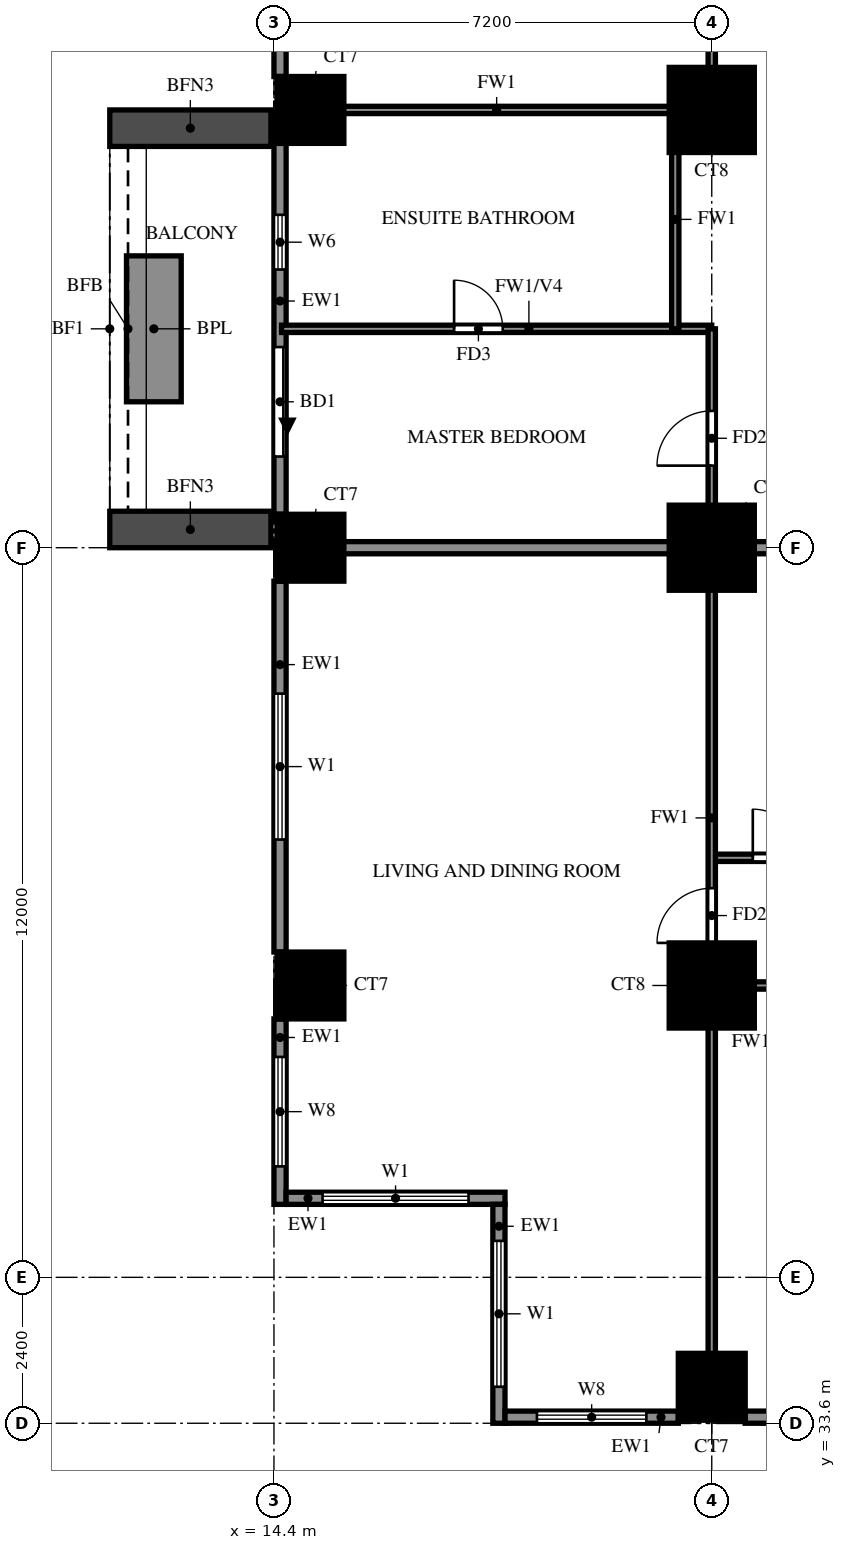
"""IFC4 building model, lengths in metres.
Left out: names, types, materials, properties, quantities, classifications, styles, units other than length and angle.
Written with IfcOpenShell. Run it as: python <this file> out.ifc"""

import sys

from ifc_helpers import new_model, si_unit, direction, frame, frame_2d, origin, origin_2d, place, context, subcontext, project, spatial, rectangle, extrude, source, transform, mapped, element, fill, save


model = new_model("IFC4")
c1 = context("Model", 3, precision=1e-05, world=origin(), true_north=direction((0.0, 1.0)))
c2 = subcontext(c1, "Body", "Model", "MODEL_VIEW")
j1 = project(units=[si_unit("LENGTHUNIT", "METRE"), si_unit("PLANEANGLEUNIT", "RADIAN")], contexts=[c1])
p1 = place(None, origin())
s1 = spatial("IfcSite", under=j1, at=p1, CompositionType="ELEMENT")
p2 = place(p1, origin())
s2 = spatial("IfcBuilding", under=s1, at=p2, CompositionType="ELEMENT")
p3 = place(p2, frame((0.0, 0.0, 58.5)))
s3 = spatial("IfcBuildingStorey", under=s2, at=p3, CompositionType="ELEMENT", Elevation=58.5)
m1 = source(origin(), c2, "Body", "SweptSolid", [
    extrude(rectangle(XDim=1.1, YDim=1.1, at=origin_2d()), origin(), (0.0, 0.0, 1.0), 3.18),
])
for number, where, z_axis, x_axis in (
    (1, (21.6, 34.2, 0.0), (0.0, 0.0, 1.0), (1.0, 0.0, 0.0)),
    (2, (15.0, 40.8, 0.0), (0.0, 0.0, 1.0), (1.0, 0.0, 0.0)),
):
    element("IfcColumn", number, at=place(p3, frame(where, z_axis=z_axis, x_axis=x_axis)), inside=s3, PredefinedType="COLUMN", context=c2, shape_type="MappedRepresentation", body=[
        mapped(m1, transform((0.0, 0.0, 0.0))),
    ])
m2 = source(origin(), c2, "Body", "SweptSolid", [
    extrude(rectangle(XDim=1.4, YDim=1.4, at=origin_2d()), origin(), (0.0, 0.0, 1.0), 3.18),
])
p4 = place(p3, frame((21.6, 40.8, 0.0), z_axis=(0.0, 0.0, 1.0), x_axis=(1.0, 0.0, 0.0)))
e3 = element("IfcColumn", 3, at=p4, inside=s3, PredefinedType="COLUMN", context=c2, shape_type="MappedRepresentation", body=[
    mapped(m2, transform((0.0, 0.0, 0.0))),
])
p5 = place(p3, frame((15.0, 48.0, 0.0), z_axis=(0.0, 0.0, 1.0), x_axis=(1.0, 0.0, 0.0)))
e4 = element("IfcColumn", 4, at=p5, inside=s3, PredefinedType="COLUMN", context=c2, shape_type="MappedRepresentation", body=[
    mapped(m1, transform((0.0, 0.0, 0.0))),
])
p6 = place(p3, frame((21.6, 48.0, 0.0), z_axis=(0.0, 0.0, 1.0), x_axis=(1.0, 0.0, 0.0)))
e5 = element("IfcColumn", 5, at=p6, inside=s3, PredefinedType="COLUMN", context=c2, shape_type="MappedRepresentation", body=[
    mapped(m2, transform((0.0, 0.0, 0.0))),
])
p7 = place(p3, frame((15.0, 55.2, 0.0), z_axis=(0.0, 0.0, 1.0), x_axis=(1.0, 0.0, 0.0)))
e6 = element("IfcColumn", 6, at=p7, inside=s3, PredefinedType="COLUMN", context=c2, shape_type="MappedRepresentation", body=[
    mapped(m1, transform((0.0, 0.0, 0.0))),
])
p8 = place(p3, frame((21.6, 55.2, 0.0), z_axis=(0.0, 0.0, 1.0), x_axis=(1.0, 0.0, 0.0)))
e7 = element("IfcColumn", 7, at=p8, inside=s3, PredefinedType="COLUMN", context=c2, shape_type="MappedRepresentation", body=[
    mapped(m2, transform((0.0, 0.0, 0.0))),
])
p9 = place(p3, frame((14.5, 61.85, 0.0), z_axis=(0.0, 0.0, 1.0), x_axis=(0.0, -1.0, 0.0)))
e8 = element("IfcWall", 8, at=p9, inside=s3, PredefinedType="SOLIDWALL", context=c2, shape_type="SweptSolid", body=[
    extrude(rectangle(XDim=6.1, YDim=0.2, at=frame_2d((3.05, 0.0))), origin(), (0.0, 0.0, 1.0), 3.18),
])
p10 = place(p9, frame((3.575, 0.0, 0.6)))
e9 = element("IfcOpeningElement", 9, at=p10, cuts=e8, PredefinedType="OPENING", context=c2, shape_type="SweptSolid", body=[
    extrude(rectangle(XDim=1.8, YDim=2.4, at=frame_2d((0.9, 1.2))), frame((0.0, 0.11, 0.0), z_axis=(0.0, -1.0, 0.0), x_axis=(1.0, 0.0, 0.0)), (0.0, 0.0, 1.0), 0.22),
])
p11 = place(p9, frame((0.725, 0.0, 0.6)))
e10 = element("IfcOpeningElement", 10, at=p11, cuts=e8, PredefinedType="OPENING", context=c2, shape_type="SweptSolid", body=[
    extrude(rectangle(XDim=1.8, YDim=2.4, at=frame_2d((0.9, 1.2))), frame((0.0, 0.11, 0.0), z_axis=(0.0, -1.0, 0.0), x_axis=(1.0, 0.0, 0.0)), (0.0, 0.0, 1.0), 0.22),
])
p12 = place(p3, frame((14.5, 54.65, 0.0), z_axis=(0.0, 0.0, 1.0), x_axis=(0.0, -1.0, 0.0)))
e11 = element("IfcWall", 11, at=p12, inside=s3, PredefinedType="SOLIDWALL", context=c2, shape_type="SweptSolid", body=[
    extrude(rectangle(XDim=6.1, YDim=0.2, at=frame_2d((3.05, 0.0))), origin(), (0.0, 0.0, 1.0), 3.18),
])
p13 = place(p12, frame((3.35, 0.0, 0.0)))
e12 = element("IfcOpeningElement", 12, at=p13, cuts=e11, PredefinedType="OPENING", context=c2, shape_type="SweptSolid", body=[
    extrude(rectangle(XDim=1.8, YDim=2.4, at=frame_2d((0.9, 1.2))), frame((0.0, 0.11, 0.0), z_axis=(0.0, -1.0, 0.0), x_axis=(1.0, 0.0, 0.0)), (0.0, 0.0, 1.0), 0.22),
])
p14 = place(p12, frame((1.175, 0.0, 1.5)))
e13 = element("IfcOpeningElement", 13, at=p14, cuts=e11, PredefinedType="OPENING", context=c2, shape_type="SweptSolid", body=[
    extrude(rectangle(XDim=0.9, YDim=0.9, at=frame_2d((0.45, 0.45))), frame((0.0, 0.11, 0.0), z_axis=(0.0, -1.0, 0.0), x_axis=(1.0, 0.0, 0.0)), (0.0, 0.0, 1.0), 0.22),
])
p15 = place(p3, frame((14.5, 47.45, 0.0), z_axis=(0.0, 0.0, 1.0), x_axis=(0.0, -1.0, 0.0)))
e14 = element("IfcWall", 14, at=p15, inside=s3, PredefinedType="SOLIDWALL", context=c2, shape_type="SweptSolid", body=[
    extrude(rectangle(XDim=6.1, YDim=0.2, at=frame_2d((3.05, 0.0))), origin(), (0.0, 0.0, 1.0), 3.18),
])
p16 = place(p15, frame((1.85, 0.0, 0.6)))
e15 = element("IfcOpeningElement", 15, at=p16, cuts=e14, PredefinedType="OPENING", context=c2, shape_type="SweptSolid", body=[
    extrude(rectangle(XDim=2.4, YDim=2.4, at=frame_2d((1.2, 1.2))), frame((0.0, 0.11, 0.0), z_axis=(0.0, -1.0, 0.0), x_axis=(1.0, 0.0, 0.0)), (0.0, 0.0, 1.0), 0.22),
])
p17 = place(p3, frame((14.5, 40.25, 0.0), z_axis=(0.0, 0.0, 1.0), x_axis=(0.0, -1.0, 0.0)))
e16 = element("IfcWall", 16, at=p17, inside=s3, PredefinedType="SOLIDWALL", context=c2, shape_type="SweptSolid", body=[
    extrude(rectangle(XDim=3.05, YDim=0.2, at=frame_2d((1.525, 0.0))), origin(), (0.0, 0.0, 1.0), 3.18),
])
p18 = place(p17, frame((0.625, 0.0, 0.6)))
e17 = element("IfcOpeningElement", 17, at=p18, cuts=e16, PredefinedType="OPENING", context=c2, shape_type="SweptSolid", body=[
    extrude(rectangle(XDim=1.8, YDim=2.4, at=frame_2d((0.9, 1.2))), frame((0.0, 0.11, 0.0), z_axis=(0.0, -1.0, 0.0), x_axis=(1.0, 0.0, 0.0)), (0.0, 0.0, 1.0), 0.22),
])
p19 = place(p3, frame((14.6, 37.3, 0.0), z_axis=(0.0, 0.0, 1.0), x_axis=(1.0, 0.0, 0.0)))
e18 = element("IfcWall", 18, at=p19, inside=s3, PredefinedType="SOLIDWALL", context=c2, shape_type="SweptSolid", body=[
    extrude(rectangle(XDim=3.6, YDim=0.2, at=frame_2d((1.8, 0.0))), origin(), (0.0, 0.0, 1.0), 3.18),
])
p20 = place(p19, frame((0.6, 0.0, 0.6)))
e19 = element("IfcOpeningElement", 19, at=p20, cuts=e18, PredefinedType="OPENING", context=c2, shape_type="SweptSolid", body=[
    extrude(rectangle(XDim=2.4, YDim=2.4, at=frame_2d((1.2, 1.2))), frame((0.0, 0.11, 0.0), z_axis=(0.0, -1.0, 0.0), x_axis=(1.0, 0.0, 0.0)), (0.0, 0.0, 1.0), 0.22),
])
p21 = place(p3, frame((18.1, 37.2, 0.0), z_axis=(0.0, 0.0, 1.0), x_axis=(0.0, -1.0, 0.0)))
e20 = element("IfcWall", 20, at=p21, inside=s3, PredefinedType="SOLIDWALL", context=c2, shape_type="SweptSolid", body=[
    extrude(rectangle(XDim=3.6, YDim=0.2, at=frame_2d((1.8, 0.0))), origin(), (0.0, 0.0, 1.0), 3.18),
])
p22 = place(p21, frame((0.6, 0.0, 0.6)))
e21 = element("IfcOpeningElement", 21, at=p22, cuts=e20, PredefinedType="OPENING", context=c2, shape_type="SweptSolid", body=[
    extrude(rectangle(XDim=2.4, YDim=2.4, at=frame_2d((1.2, 1.2))), frame((0.0, 0.11, 0.0), z_axis=(0.0, -1.0, 0.0), x_axis=(1.0, 0.0, 0.0)), (0.0, 0.0, 1.0), 0.22),
])
p23 = place(p3, frame((18.2, 33.7, 0.0), z_axis=(0.0, 0.0, 1.0), x_axis=(1.0, 0.0, 0.0)))
e22 = element("IfcWall", 22, at=p23, inside=s3, PredefinedType="SOLIDWALL", context=c2, shape_type="SweptSolid", body=[
    extrude(rectangle(XDim=2.85, YDim=0.2, at=frame_2d((1.425, 0.0))), origin(), (0.0, 0.0, 1.0), 3.18),
])
p24 = place(p23, frame((0.525, 0.0, 0.6)))
e23 = element("IfcOpeningElement", 23, at=p24, cuts=e22, PredefinedType="OPENING", context=c2, shape_type="SweptSolid", body=[
    extrude(rectangle(XDim=1.8, YDim=2.4, at=frame_2d((0.9, 1.2))), frame((0.0, 0.11, 0.0), z_axis=(0.0, -1.0, 0.0), x_axis=(1.0, 0.0, 0.0)), (0.0, 0.0, 1.0), 0.22),
])
p25 = place(p3, frame((22.15, 33.7, 0.0), z_axis=(0.0, 0.0, 1.0), x_axis=(1.0, 0.0, 0.0)))
e24 = element("IfcWall", 24, at=p25, inside=s3, PredefinedType="SOLIDWALL", context=c2, shape_type="SweptSolid", body=[
    extrude(rectangle(XDim=6.1, YDim=0.2, at=frame_2d((3.05, 0.0))), origin(), (0.0, 0.0, 1.0), 3.18),
])
p26 = place(p25, frame((0.725, 0.0, 0.6)))
e25 = element("IfcOpeningElement", 25, at=p26, cuts=e24, PredefinedType="OPENING", context=c2, shape_type="SweptSolid", body=[
    extrude(rectangle(XDim=1.8, YDim=2.4, at=frame_2d((0.9, 1.2))), frame((0.0, 0.11, 0.0), z_axis=(0.0, -1.0, 0.0), x_axis=(1.0, 0.0, 0.0)), (0.0, 0.0, 1.0), 0.22),
])
p27 = place(p25, frame((4.025, 0.0, 1.5)))
e26 = element("IfcOpeningElement", 26, at=p27, cuts=e24, PredefinedType="OPENING", context=c2, shape_type="SweptSolid", body=[
    extrude(rectangle(XDim=0.9, YDim=0.9, at=frame_2d((0.45, 0.45))), frame((0.0, 0.11, 0.0), z_axis=(0.0, -1.0, 0.0), x_axis=(1.0, 0.0, 0.0)), (0.0, 0.0, 1.0), 0.22),
])
for number, where, z_axis, x_axis in (
    (27, (14.35, 54.9, 0.0), (0.0, 0.0, 1.0), (-1.0, 0.0, 0.0)),
    (28, (14.35, 48.3, 0.0), (0.0, 0.0, 1.0), (-1.0, 0.0, 0.0)),
):
    element("IfcWall", number, at=place(p3, frame(where, z_axis=z_axis, x_axis=x_axis)), inside=s3, PredefinedType="SOLIDWALL", context=c2, shape_type="SweptSolid", body=[
        extrude(rectangle(XDim=2.65, YDim=0.6, at=frame_2d((1.325, 0.0))), origin(), (0.0, 0.0, 1.0), 2.85),
    ])
p28 = place(p3, frame((12.425, 52.8, 0.0), z_axis=(0.0, 0.0, 1.0), x_axis=(0.0, -1.0, 0.0)))
e29 = element("IfcWall", 29, at=p28, inside=s3, PredefinedType="SOLIDWALL", context=c2, shape_type="SweptSolid", body=[
    extrude(rectangle(XDim=2.4, YDim=0.9, at=frame_2d((1.2, 0.0))), origin(), (0.0, 0.0, 1.0), 0.9),
])
p29 = place(p3, frame((14.525, 48.0, 0.0), z_axis=(0.0, 0.0, 1.0), x_axis=(1.0, 0.0, 0.0)))
e30 = element("IfcWall", 30, at=p29, inside=s3, PredefinedType="SOLIDWALL", context=c2, shape_type="SweptSolid", body=[
    extrude(rectangle(XDim=19.075, YDim=0.2, at=frame_2d((9.538, 0.0))), origin(), (0.0, 0.0, 1.0), 3.18),
])
p30 = place(p3, frame((21.6, 40.8, 0.0), z_axis=(0.0, 0.0, 1.0), x_axis=(1.0, 0.0, 0.0)))
e31 = element("IfcWall", 31, at=p30, inside=s3, PredefinedType="PARTITIONING", context=c2, shape_type="SweptSolid", body=[
    extrude(rectangle(XDim=3.6, YDim=0.12, at=frame_2d((1.8, 0.0))), origin(), (0.0, 0.0, 1.0), 3.18),
])
p31 = place(p30, frame((1.35, 0.0, 0.0)))
e32 = element("IfcOpeningElement", 32, at=p31, cuts=e31, PredefinedType="OPENING", context=c2, shape_type="SweptSolid", body=[
    extrude(rectangle(XDim=0.9, YDim=2.1, at=frame_2d((0.45, 1.05))), frame((0.0, 0.07, 0.0), z_axis=(0.0, -1.0, 0.0), x_axis=(1.0, 0.0, 0.0)), (0.0, 0.0, 1.0), 0.14),
])
p32 = place(p3, frame((21.6, 42.9, 0.0), z_axis=(0.0, 0.0, 1.0), x_axis=(1.0, 0.0, 0.0)))
e33 = element("IfcWall", 33, at=p32, inside=s3, PredefinedType="PARTITIONING", context=c2, shape_type="SweptSolid", body=[
    extrude(rectangle(XDim=12.0, YDim=0.12, at=frame_2d((6.0, 0.0))), origin(), (0.0, 0.0, 1.0), 3.18),
])
p33 = place(p32, frame((0.675, 0.0, 0.0)))
e34 = element("IfcOpeningElement", 34, at=p33, cuts=e33, PredefinedType="OPENING", context=c2, shape_type="SweptSolid", body=[
    extrude(rectangle(XDim=0.8, YDim=2.1, at=frame_2d((0.4, 1.05))), frame((0.0, 0.07, 0.0), z_axis=(0.0, -1.0, 0.0), x_axis=(1.0, 0.0, 0.0)), (0.0, 0.0, 1.0), 0.14),
])
p34 = place(p32, frame((4.0, 0.0, 0.0)))
e35 = element("IfcOpeningElement", 35, at=p34, cuts=e33, PredefinedType="OPENING", context=c2, shape_type="SweptSolid", body=[
    extrude(rectangle(XDim=0.9, YDim=2.1, at=frame_2d((0.45, 1.05))), frame((0.0, 0.07, 0.0), z_axis=(0.0, -1.0, 0.0), x_axis=(1.0, 0.0, 0.0)), (0.0, 0.0, 1.0), 0.14),
])
p35 = place(p32, frame((7.475, 0.0, 0.0)))
e36 = element("IfcOpeningElement", 36, at=p35, cuts=e33, PredefinedType="OPENING", context=c2, shape_type="SweptSolid", body=[
    extrude(rectangle(XDim=0.9, YDim=2.1, at=frame_2d((0.45, 1.05))), frame((0.0, 0.07, 0.0), z_axis=(0.0, -1.0, 0.0), x_axis=(1.0, 0.0, 0.0)), (0.0, 0.0, 1.0), 0.14),
])
p36 = place(p32, frame((10.1, 0.0, 0.0)))
e37 = element("IfcOpeningElement", 37, at=p36, cuts=e33, PredefinedType="OPENING", context=c2, shape_type="SweptSolid", body=[
    extrude(rectangle(XDim=0.9, YDim=2.1, at=frame_2d((0.45, 1.05))), frame((0.0, 0.07, 0.0), z_axis=(0.0, -1.0, 0.0), x_axis=(1.0, 0.0, 0.0)), (0.0, 0.0, 1.0), 0.14),
])
p37 = place(p3, frame((14.525, 51.6, 0.0), z_axis=(0.0, 0.0, 1.0), x_axis=(1.0, 0.0, 0.0)))
e38 = element("IfcWall", 38, at=p37, inside=s3, PredefinedType="PARTITIONING", context=c2, shape_type="SweptSolid", body=[
    extrude(rectangle(XDim=7.075, YDim=0.12, at=frame_2d((3.538, 0.0))), origin(), (0.0, 0.0, 1.0), 2.28),
])
p38 = place(p37, frame((2.837, 0.0, 0.0)))
e39 = element("IfcOpeningElement", 39, at=p38, cuts=e38, PredefinedType="OPENING", context=c2, shape_type="SweptSolid", body=[
    extrude(rectangle(XDim=0.8, YDim=2.1, at=frame_2d((0.4, 1.05))), frame((0.0, 0.07, 0.0), z_axis=(0.0, -1.0, 0.0), x_axis=(1.0, 0.0, 0.0)), (0.0, 0.0, 1.0), 0.14),
])
p39 = place(p3, frame((14.525, 55.2, 0.0), z_axis=(0.0, 0.0, 1.0), x_axis=(1.0, 0.0, 0.0)))
e40 = element("IfcWall", 40, at=p39, inside=s3, PredefinedType="PARTITIONING", context=c2, shape_type="SweptSolid", body=[
    extrude(rectangle(XDim=7.075, YDim=0.12, at=frame_2d((3.538, 0.0))), origin(), (0.0, 0.0, 1.0), 3.18),
])
p40 = place(p3, frame((21.0, 51.6, 0.0), z_axis=(0.0, 0.0, 1.0), x_axis=(0.0, 1.0, 0.0)))
e41 = element("IfcWall", 41, at=p40, inside=s3, PredefinedType="PARTITIONING", context=c2, shape_type="SweptSolid", body=[
    extrude(rectangle(XDim=3.6, YDim=0.12, at=frame_2d((1.8, 0.0))), origin(), (0.0, 0.0, 1.0), 3.18),
])
p41 = place(p3, frame((21.6, 33.725, 0.0), z_axis=(0.0, 0.0, 1.0), x_axis=(0.0, 1.0, 0.0)))
e42 = element("IfcWall", 42, at=p41, inside=s3, PredefinedType="PARTITIONING", context=c2, shape_type="SweptSolid", body=[
    extrude(rectangle(XDim=17.875, YDim=0.12, at=frame_2d((8.938, 0.0))), origin(), (0.0, 0.0, 1.0), 3.18),
])
p42 = place(p41, frame((7.775, 0.0, 0.0)))
e43 = element("IfcOpeningElement", 43, at=p42, cuts=e42, PredefinedType="OPENING", context=c2, shape_type="SweptSolid", body=[
    extrude(rectangle(XDim=0.9, YDim=2.1, at=frame_2d((0.45, 1.05))), frame((0.0, 0.07, 0.0), z_axis=(0.0, -1.0, 0.0), x_axis=(1.0, 0.0, 0.0)), (0.0, 0.0, 1.0), 0.14),
])
p43 = place(p41, frame((15.625, 0.0, 0.0)))
e44 = element("IfcOpeningElement", 44, at=p43, cuts=e42, PredefinedType="OPENING", context=c2, shape_type="SweptSolid", body=[
    extrude(rectangle(XDim=0.9, YDim=2.1, at=frame_2d((0.45, 1.05))), frame((0.0, 0.07, 0.0), z_axis=(0.0, -1.0, 0.0), x_axis=(1.0, 0.0, 0.0)), (0.0, 0.0, 1.0), 0.14),
])
p44 = place(p3, frame((21.6, 55.2, 0.0), z_axis=(0.0, 0.0, 1.0), x_axis=(0.0, 1.0, 0.0)))
e45 = element("IfcWall", 45, at=p44, inside=s3, PredefinedType="PARTITIONING", context=c2, shape_type="SweptSolid", body=[
    extrude(rectangle(XDim=14.4, YDim=0.12, at=frame_2d((7.2, 0.0))), origin(), (0.0, 0.0, 1.0), 3.18),
])
p45 = place(p44, frame((1.05, 0.0, 0.0)))
e46 = element("IfcOpeningElement", 46, at=p45, cuts=e45, PredefinedType="OPENING", context=c2, shape_type="SweptSolid", body=[
    extrude(rectangle(XDim=1.5, YDim=2.1, at=frame_2d((0.75, 1.05))), frame((0.0, 0.07, 0.0), z_axis=(0.0, -1.0, 0.0), x_axis=(1.0, 0.0, 0.0)), (0.0, 0.0, 1.0), 0.14),
])
p46 = place(p44, frame((4.95, 0.0, 0.0)))
e47 = element("IfcOpeningElement", 47, at=p46, cuts=e45, PredefinedType="OPENING", context=c2, shape_type="SweptSolid", body=[
    extrude(rectangle(XDim=0.9, YDim=2.1, at=frame_2d((0.45, 1.05))), frame((0.0, 0.07, 0.0), z_axis=(0.0, -1.0, 0.0), x_axis=(1.0, 0.0, 0.0)), (0.0, 0.0, 1.0), 0.14),
])
p47 = place(p44, frame((10.35, 0.0, 0.0)))
e48 = element("IfcOpeningElement", 48, at=p47, cuts=e45, PredefinedType="OPENING", context=c2, shape_type="SweptSolid", body=[
    extrude(rectangle(XDim=0.9, YDim=2.1, at=frame_2d((0.45, 1.05))), frame((0.0, 0.07, 0.0), z_axis=(0.0, -1.0, 0.0), x_axis=(1.0, 0.0, 0.0)), (0.0, 0.0, 1.0), 0.14),
])
p48 = place(p13, origin())
e49 = element("IfcDoor", 49, at=p48, inside=s3, OperationType="DOUBLE_DOOR_SLIDING", PredefinedType="DOOR", context=c2, shape_type="SweptSolid", body=[
    extrude(rectangle(XDim=1.8, YDim=2.4, at=frame_2d((0.9, 1.2))), frame((0.0, 0.025, 0.0), z_axis=(0.0, -1.0, 0.0), x_axis=(1.0, 0.0, 0.0)), (0.0, 0.0, 1.0), 0.05),
])
fill(e12, e49)
p49 = place(p14, origin())
e50 = element("IfcWindow", 50, at=p49, inside=s3, PartitioningType="SINGLE_PANEL", PredefinedType="WINDOW", context=c2, shape_type="SweptSolid", body=[
    extrude(rectangle(XDim=0.9, YDim=0.9, at=frame_2d((0.45, 0.45))), frame((0.0, 0.03, 0.0), z_axis=(0.0, -1.0, 0.0), x_axis=(1.0, 0.0, 0.0)), (0.0, 0.0, 1.0), 0.06),
])
fill(e13, e50)
p50 = place(p16, origin())
e51 = element("IfcWindow", 51, at=p50, inside=s3, PartitioningType="DOUBLE_PANEL_VERTICAL", PredefinedType="WINDOW", context=c2, shape_type="SweptSolid", body=[
    extrude(rectangle(XDim=2.4, YDim=2.4, at=frame_2d((1.2, 1.2))), frame((0.0, 0.03, 0.0), z_axis=(0.0, -1.0, 0.0), x_axis=(1.0, 0.0, 0.0)), (0.0, 0.0, 1.0), 0.06),
])
fill(e15, e51)
p51 = place(p18, origin())
e52 = element("IfcWindow", 52, at=p51, inside=s3, PartitioningType="DOUBLE_PANEL_VERTICAL", PredefinedType="WINDOW", context=c2, shape_type="SweptSolid", body=[
    extrude(rectangle(XDim=1.8, YDim=2.4, at=frame_2d((0.9, 1.2))), frame((0.0, 0.03, 0.0), z_axis=(0.0, -1.0, 0.0), x_axis=(1.0, 0.0, 0.0)), (0.0, 0.0, 1.0), 0.06),
])
fill(e17, e52)
p52 = place(p20, origin())
e53 = element("IfcWindow", 53, at=p52, inside=s3, PartitioningType="DOUBLE_PANEL_VERTICAL", PredefinedType="WINDOW", context=c2, shape_type="SweptSolid", body=[
    extrude(rectangle(XDim=2.4, YDim=2.4, at=frame_2d((1.2, 1.2))), frame((0.0, 0.03, 0.0), z_axis=(0.0, -1.0, 0.0), x_axis=(1.0, 0.0, 0.0)), (0.0, 0.0, 1.0), 0.06),
])
fill(e19, e53)
p53 = place(p22, origin())
e54 = element("IfcWindow", 54, at=p53, inside=s3, PartitioningType="DOUBLE_PANEL_VERTICAL", PredefinedType="WINDOW", context=c2, shape_type="SweptSolid", body=[
    extrude(rectangle(XDim=2.4, YDim=2.4, at=frame_2d((1.2, 1.2))), frame((0.0, 0.03, 0.0), z_axis=(0.0, -1.0, 0.0), x_axis=(1.0, 0.0, 0.0)), (0.0, 0.0, 1.0), 0.06),
])
fill(e21, e54)
p54 = place(p24, origin())
e55 = element("IfcWindow", 55, at=p54, inside=s3, PartitioningType="DOUBLE_PANEL_VERTICAL", PredefinedType="WINDOW", context=c2, shape_type="SweptSolid", body=[
    extrude(rectangle(XDim=1.8, YDim=2.4, at=frame_2d((0.9, 1.2))), frame((0.0, 0.03, 0.0), z_axis=(0.0, -1.0, 0.0), x_axis=(1.0, 0.0, 0.0)), (0.0, 0.0, 1.0), 0.06),
])
fill(e23, e55)
p55 = place(p42, origin())
e56 = element("IfcDoor", 56, at=p55, inside=s3, OperationType="SINGLE_SWING_LEFT", PredefinedType="DOOR", context=c2, shape_type="SweptSolid", body=[
    extrude(rectangle(XDim=0.9, YDim=2.1, at=frame_2d((0.45, 1.05))), frame((0.0, 0.025, 0.0), z_axis=(0.0, -1.0, 0.0), x_axis=(1.0, 0.0, 0.0)), (0.0, 0.0, 1.0), 0.05),
])
fill(e43, e56)
p56 = place(p33, origin())
e57 = element("IfcDoor", 57, at=p56, inside=s3, OperationType="SINGLE_SWING_RIGHT", PredefinedType="DOOR", context=c2, shape_type="SweptSolid", body=[
    extrude(rectangle(XDim=0.8, YDim=2.1, at=frame_2d((0.4, 1.05))), frame((0.0, 0.025, 0.0), z_axis=(0.0, -1.0, 0.0), x_axis=(1.0, 0.0, 0.0)), (0.0, 0.0, 1.0), 0.05),
])
fill(e34, e57)
p57 = place(p43, origin())
e58 = element("IfcDoor", 58, at=p57, inside=s3, OperationType="SINGLE_SWING_LEFT", PredefinedType="DOOR", context=c2, shape_type="SweptSolid", body=[
    extrude(rectangle(XDim=0.9, YDim=2.1, at=frame_2d((0.45, 1.05))), frame((0.0, 0.025, 0.0), z_axis=(0.0, -1.0, 0.0), x_axis=(1.0, 0.0, 0.0)), (0.0, 0.0, 1.0), 0.05),
])
fill(e44, e58)
p58 = place(p38, origin())
e59 = element("IfcDoor", 59, at=p58, inside=s3, OperationType="SINGLE_SWING_LEFT", PredefinedType="DOOR", context=c2, shape_type="SweptSolid", body=[
    extrude(rectangle(XDim=0.8, YDim=2.1, at=frame_2d((0.4, 1.05))), frame((0.0, 0.025, 0.0), z_axis=(0.0, -1.0, 0.0), x_axis=(1.0, 0.0, 0.0)), (0.0, 0.0, 1.0), 0.05),
])
fill(e39, e59)
save(model, sys.argv[1])
